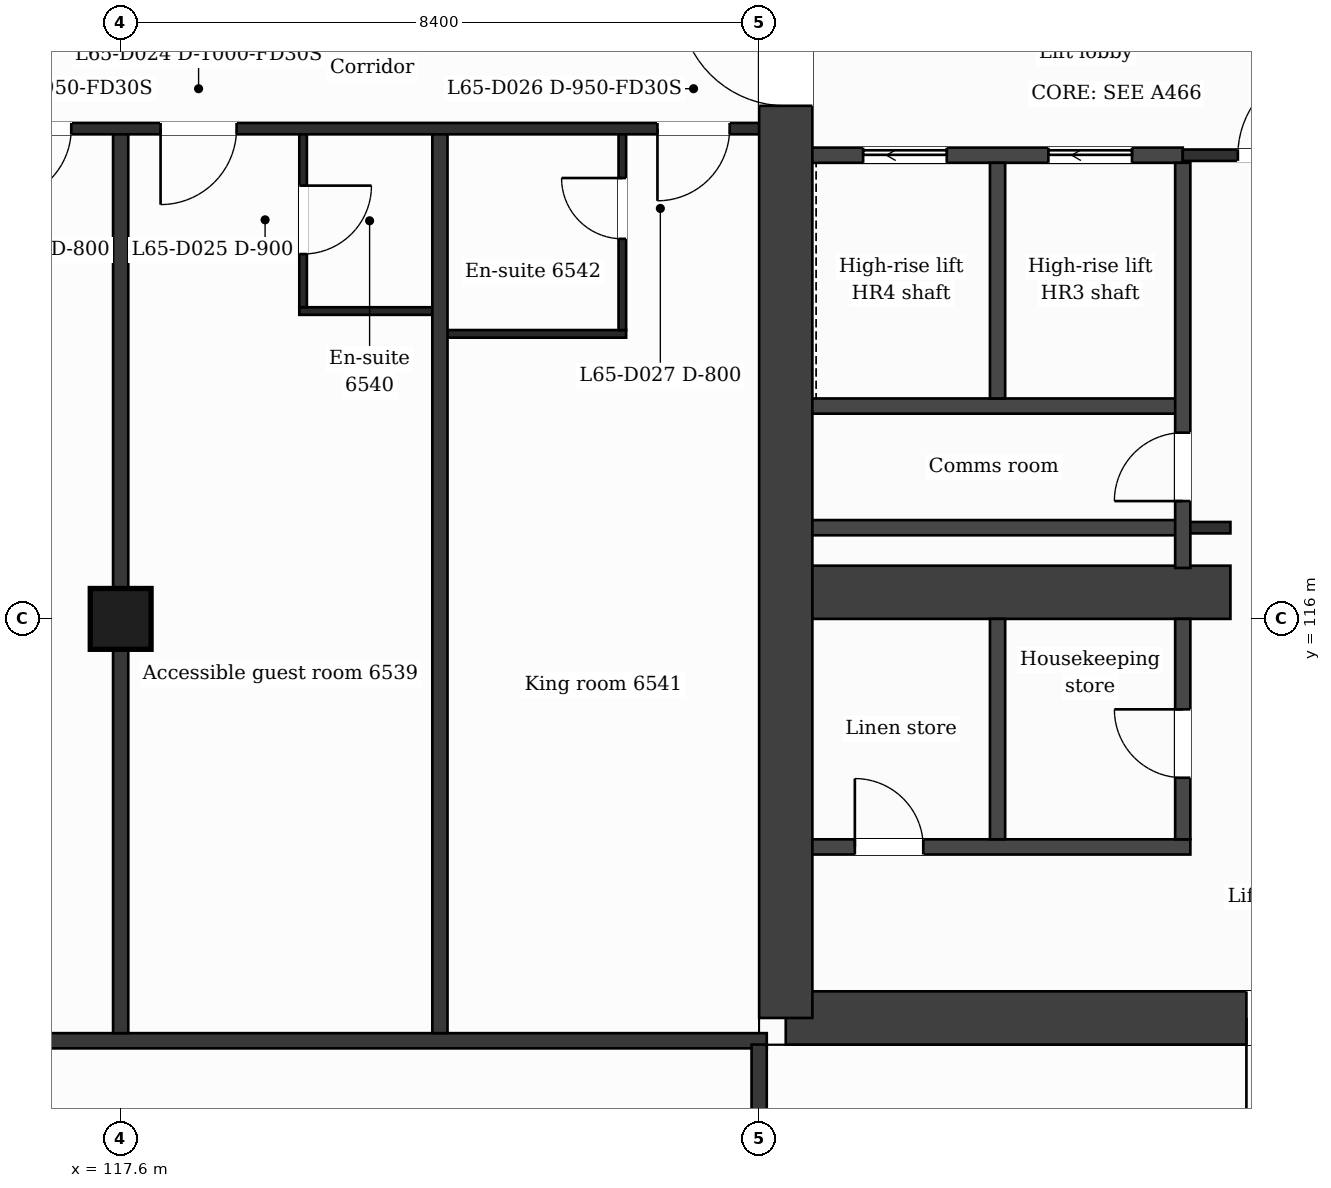
"""IFC4 building model, lengths in metres.
Left out: names, types, materials, properties, quantities, classifications, styles, units other than length and angle.
Written with IfcOpenShell. Run it as: python <this file> out.ifc"""

import sys

from ifc_helpers import new_model, si_unit, direction, frame, frame_2d, origin, origin_2d, place, context, subcontext, project, spatial, rectangle, extrude, element, fill, save


model = new_model("IFC4")
c1 = context("Model", 3, precision=1e-05, world=origin(), true_north=direction((0.0, 1.0)))
c2 = subcontext(c1, "Body", "Model", "MODEL_VIEW")
j1 = project(units=[si_unit("LENGTHUNIT", "METRE"), si_unit("PLANEANGLEUNIT", "RADIAN")], contexts=[c1])
p1 = place(None, origin())
s1 = spatial("IfcSite", under=j1, at=p1, CompositionType="ELEMENT")
p2 = place(p1, origin())
s2 = spatial("IfcBuilding", under=s1, at=p2, CompositionType="ELEMENT")
p3 = place(p2, frame((0.0, 0.0, 270.1)))
s3 = spatial("IfcBuildingStorey", under=s2, at=p3, CompositionType="ELEMENT", Elevation=270.1)
p4 = place(p3, frame((140.73, 110.75, 0.0), z_axis=(0.0, 0.0, 1.0), x_axis=(-1.0, 0.0, 0.0)))
e1 = element("IfcWall", 1, at=p4, inside=s3, PredefinedType="SHEAR", context=c2, shape_type="SweptSolid", body=[
    extrude(rectangle(XDim=14.38, YDim=0.7, at=frame_2d((7.19, 0.0))), origin(), (0.0, 0.0, 1.0), 3.7),
])
p5 = place(p4, frame((7.12, 0.0, 0.0)))
e2 = element("IfcOpeningElement", 2, at=p5, cuts=e1, PredefinedType="OPENING", context=c2, shape_type="SweptSolid", body=[
    extrude(rectangle(XDim=1.2, YDim=2.1, at=frame_2d((0.6, 1.05))), frame((0.0, 0.36, 0.0), z_axis=(0.0, -1.0, 0.0), x_axis=(1.0, 0.0, 0.0)), (0.0, 0.0, 1.0), 0.72),
])
p6 = place(p3, frame((126.35, 110.75, 0.0), z_axis=(0.0, 0.0, 1.0), x_axis=(0.0, 1.0, 0.0)))
e3 = element("IfcWall", 3, at=p6, inside=s3, PredefinedType="SHEAR", context=c2, shape_type="SweptSolid", body=[
    extrude(rectangle(XDim=21.3, YDim=0.7, at=frame_2d((10.65, 0.0))), origin(), (0.0, 0.0, 1.0), 3.7),
])
p7 = place(p6, frame((12.0, 0.0, 0.0)))
e4 = element("IfcOpeningElement", 4, at=p7, cuts=e3, PredefinedType="OPENING", context=c2, shape_type="SweptSolid", body=[
    extrude(rectangle(XDim=1.4, YDim=2.1, at=frame_2d((0.7, 1.05))), frame((0.0, 0.36, 0.0), z_axis=(0.0, -1.0, 0.0), x_axis=(1.0, 0.0, 0.0)), (0.0, 0.0, 1.0), 0.72),
])
p8 = place(p3, frame((126.7, 116.35, 0.0), z_axis=(0.0, 0.0, 1.0), x_axis=(1.0, 0.0, 0.0)))
e5 = element("IfcWall", 5, at=p8, inside=s3, PredefinedType="SHEAR", context=c2, shape_type="SweptSolid", body=[
    extrude(rectangle(XDim=5.5, YDim=0.7, at=frame_2d((2.75, 0.0))), origin(), (0.0, 0.0, 1.0), 3.7),
])
p9 = place(p3, frame((117.6, 116.0, 0.0), z_axis=(0.0, 0.0, 1.0), x_axis=(1.0, 0.0, 0.0)))
e6 = element("IfcColumn", 6, at=p9, inside=s3, PredefinedType="COLUMN", context=c2, shape_type="SweptSolid", body=[
    extrude(rectangle(XDim=0.8, YDim=0.8, at=origin_2d()), origin(), (0.0, 0.0, 1.0), 3.7),
])
p10 = place(p3, frame((100.7, 110.45, 0.0), z_axis=(0.0, 0.0, 1.0), x_axis=(1.0, 0.0, 0.0)))
e7 = element("IfcWall", 7, at=p10, inside=s3, PredefinedType="PARTITIONING", context=c2, shape_type="SweptSolid", body=[
    extrude(rectangle(XDim=25.4, YDim=0.2, at=frame_2d((12.7, 0.0))), origin(), (0.0, 0.0, 1.0), 3.38),
])
p11 = place(p3, frame((126.7, 113.0, 0.0), z_axis=(0.0, 0.0, 1.0), x_axis=(1.0, 0.0, 0.0)))
e8 = element("IfcWall", 8, at=p11, inside=s3, PredefinedType="PARTITIONING", context=c2, shape_type="SweptSolid", body=[
    extrude(rectangle(XDim=4.973, YDim=0.2, at=frame_2d((2.487, 0.0))), origin(), (0.0, 0.0, 1.0), 3.38),
])
p12 = place(p11, frame((0.559, 0.0, 0.0)))
e9 = element("IfcOpeningElement", 9, at=p12, cuts=e8, PredefinedType="OPENING", context=c2, shape_type="SweptSolid", body=[
    extrude(rectangle(XDim=0.9, YDim=2.1, at=frame_2d((0.45, 1.05))), frame((0.0, 0.11, 0.0), z_axis=(0.0, -1.0, 0.0), x_axis=(1.0, 0.0, 0.0)), (0.0, 0.0, 1.0), 0.22),
])
p13 = place(p3, frame((126.7, 117.2, 0.0), z_axis=(0.0, 0.0, 1.0), x_axis=(1.0, 0.0, 0.0)))
e10 = element("IfcWall", 10, at=p13, inside=s3, PredefinedType="PARTITIONING", context=c2, shape_type="SweptSolid", body=[
    extrude(rectangle(XDim=4.873, YDim=0.2, at=frame_2d((2.437, 0.0))), origin(), (0.0, 0.0, 1.0), 3.38),
])
p14 = place(p3, frame((131.573, 117.2, 0.0), z_axis=(0.0, 0.0, 1.0), x_axis=(1.0, 0.0, 0.0)))
e11 = element("IfcWall", 11, at=p14, inside=s3, PredefinedType="PARTITIONING", context=c2, shape_type="SweptSolid", body=[
    extrude(rectangle(XDim=0.627, YDim=0.15, at=frame_2d((0.313, 0.0))), origin(), (0.0, 0.0, 1.0), 3.38),
])
p15 = place(p3, frame((126.7, 118.8, 0.0), z_axis=(0.0, 0.0, 1.0), x_axis=(1.0, 0.0, 0.0)))
e12 = element("IfcWall", 12, at=p15, inside=s3, PredefinedType="PARTITIONING", context=c2, shape_type="SweptSolid", body=[
    extrude(rectangle(XDim=4.873, YDim=0.2, at=frame_2d((2.437, 0.0))), origin(), (0.0, 0.0, 1.0), 3.38),
])
p16 = place(p3, frame((121.8, 119.75, 0.0), z_axis=(0.0, 0.0, 1.0), x_axis=(1.0, 0.0, 0.0)))
e13 = element("IfcWall", 13, at=p16, inside=s3, PredefinedType="PARTITIONING", context=c2, shape_type="SweptSolid", body=[
    extrude(rectangle(XDim=2.45, YDim=0.1, at=frame_2d((1.225, 0.0))), origin(), (0.0, 0.0, 1.0), 3.38),
])
p17 = place(p3, frame((119.95, 120.05, 0.0), z_axis=(0.0, 0.0, 1.0), x_axis=(1.0, 0.0, 0.0)))
e14 = element("IfcWall", 14, at=p17, inside=s3, PredefinedType="PARTITIONING", context=c2, shape_type="SweptSolid", body=[
    extrude(rectangle(XDim=1.85, YDim=0.1, at=frame_2d((0.925, 0.0))), origin(), (0.0, 0.0, 1.0), 3.38),
])
p18 = place(p3, frame((126.7, 122.1, 0.0), z_axis=(0.0, 0.0, 1.0), x_axis=(1.0, 0.0, 0.0)))
e15 = element("IfcWall", 15, at=p18, inside=s3, PredefinedType="PARTITIONING", context=c2, shape_type="SweptSolid", body=[
    extrude(rectangle(XDim=4.873, YDim=0.2, at=frame_2d((2.437, 0.0))), origin(), (0.0, 0.0, 1.0), 3.38),
])
p19 = place(p18, frame((3.105, 0.0, 0.0)))
e16 = element("IfcOpeningElement", 16, at=p19, cuts=e15, PredefinedType="OPENING", context=c2, shape_type="SweptSolid", body=[
    extrude(rectangle(XDim=1.1, YDim=2.1, at=frame_2d((0.55, 1.05))), frame((0.0, 0.11, 0.0), z_axis=(0.0, -1.0, 0.0), x_axis=(1.0, 0.0, 0.0)), (0.0, 0.0, 1.0), 0.22),
])
p20 = place(p18, frame((0.668, 0.0, 0.0)))
e17 = element("IfcOpeningElement", 17, at=p20, cuts=e15, PredefinedType="OPENING", context=c2, shape_type="SweptSolid", body=[
    extrude(rectangle(XDim=1.1, YDim=2.1, at=frame_2d((0.55, 1.05))), frame((0.0, 0.11, 0.0), z_axis=(0.0, -1.0, 0.0), x_axis=(1.0, 0.0, 0.0)), (0.0, 0.0, 1.0), 0.22),
])
p21 = place(p3, frame((131.573, 122.1, 0.0), z_axis=(0.0, 0.0, 1.0), x_axis=(1.0, 0.0, 0.0)))
e18 = element("IfcWall", 18, at=p21, inside=s3, PredefinedType="PARTITIONING", context=c2, shape_type="SweptSolid", body=[
    extrude(rectangle(XDim=2.4, YDim=0.15, at=frame_2d((1.2, 0.0))), origin(), (0.0, 0.0, 1.0), 3.38),
])
p22 = place(p21, frame((0.725, 0.0, 0.0)))
e19 = element("IfcOpeningElement", 19, at=p22, cuts=e18, PredefinedType="OPENING", context=c2, shape_type="SweptSolid", body=[
    extrude(rectangle(XDim=1.2, YDim=2.1, at=frame_2d((0.6, 1.05))), frame((0.0, 0.085, 0.0), z_axis=(0.0, -1.0, 0.0), x_axis=(1.0, 0.0, 0.0)), (0.0, 0.0, 1.0), 0.17),
])
p23 = place(p3, frame((100.8, 122.45, 0.0), z_axis=(0.0, 0.0, 1.0), x_axis=(1.0, 0.0, 0.0)))
e20 = element("IfcWall", 20, at=p23, inside=s3, PredefinedType="PARTITIONING", context=c2, shape_type="SweptSolid", body=[
    extrude(rectangle(XDim=25.2, YDim=0.15, at=frame_2d((12.6, 0.0))), origin(), (0.0, 0.0, 1.0), 3.38),
])
p24 = place(p23, frame((5.55, 0.0, 0.0)))
e21 = element("IfcOpeningElement", 21, at=p24, cuts=e20, PredefinedType="OPENING", context=c2, shape_type="SweptSolid", body=[
    extrude(rectangle(XDim=1.0, YDim=2.1, at=frame_2d((0.5, 1.05))), frame((0.0, 0.085, 0.0), z_axis=(0.0, -1.0, 0.0), x_axis=(1.0, 0.0, 0.0)), (0.0, 0.0, 1.0), 0.17),
])
p25 = place(p23, frame((8.862, 0.0, 0.0)))
e22 = element("IfcOpeningElement", 22, at=p25, cuts=e20, PredefinedType="OPENING", context=c2, shape_type="SweptSolid", body=[
    extrude(rectangle(XDim=0.95, YDim=2.1, at=frame_2d((0.475, 1.05))), frame((0.0, 0.085, 0.0), z_axis=(0.0, -1.0, 0.0), x_axis=(1.0, 0.0, 0.0)), (0.0, 0.0, 1.0), 0.17),
])
p26 = place(p23, frame((15.2, 0.0, 0.0)))
e23 = element("IfcOpeningElement", 23, at=p26, cuts=e20, PredefinedType="OPENING", context=c2, shape_type="SweptSolid", body=[
    extrude(rectangle(XDim=0.95, YDim=2.1, at=frame_2d((0.475, 1.05))), frame((0.0, 0.085, 0.0), z_axis=(0.0, -1.0, 0.0), x_axis=(1.0, 0.0, 0.0)), (0.0, 0.0, 1.0), 0.17),
])
p27 = place(p23, frame((17.325, 0.0, 0.0)))
e24 = element("IfcOpeningElement", 24, at=p27, cuts=e20, PredefinedType="OPENING", context=c2, shape_type="SweptSolid", body=[
    extrude(rectangle(XDim=1.0, YDim=2.1, at=frame_2d((0.5, 1.05))), frame((0.0, 0.085, 0.0), z_axis=(0.0, -1.0, 0.0), x_axis=(1.0, 0.0, 0.0)), (0.0, 0.0, 1.0), 0.17),
])
p28 = place(p23, frame((23.862, 0.0, 0.0)))
e25 = element("IfcOpeningElement", 25, at=p28, cuts=e20, PredefinedType="OPENING", context=c2, shape_type="SweptSolid", body=[
    extrude(rectangle(XDim=0.95, YDim=2.1, at=frame_2d((0.475, 1.05))), frame((0.0, 0.085, 0.0), z_axis=(0.0, -1.0, 0.0), x_axis=(1.0, 0.0, 0.0)), (0.0, 0.0, 1.0), 0.17),
])
p29 = place(p3, frame((117.6, 110.55, 0.0), z_axis=(0.0, 0.0, 1.0), x_axis=(0.0, 1.0, 0.0)))
e26 = element("IfcWall", 26, at=p29, inside=s3, PredefinedType="PARTITIONING", context=c2, shape_type="SweptSolid", body=[
    extrude(rectangle(XDim=11.825, YDim=0.2, at=frame_2d((5.913, 0.0))), origin(), (0.0, 0.0, 1.0), 3.38),
])
p30 = place(p3, frame((120.0, 120.1, 0.0), z_axis=(0.0, 0.0, 1.0), x_axis=(0.0, 1.0, 0.0)))
e27 = element("IfcWall", 27, at=p30, inside=s3, PredefinedType="PARTITIONING", context=c2, shape_type="SweptSolid", body=[
    extrude(rectangle(XDim=2.275, YDim=0.1, at=frame_2d((1.137, 0.0))), origin(), (0.0, 0.0, 1.0), 3.38),
])
p31 = place(p30, frame((0.7, 0.0, 0.0)))
e28 = element("IfcOpeningElement", 28, at=p31, cuts=e27, PredefinedType="OPENING", context=c2, shape_type="SweptSolid", body=[
    extrude(rectangle(XDim=0.9, YDim=2.1, at=frame_2d((0.45, 1.05))), frame((0.0, 0.06, 0.0), z_axis=(0.0, -1.0, 0.0), x_axis=(1.0, 0.0, 0.0)), (0.0, 0.0, 1.0), 0.12),
])
p32 = place(p3, frame((121.8, 110.55, 0.0), z_axis=(0.0, 0.0, 1.0), x_axis=(0.0, 1.0, 0.0)))
e29 = element("IfcWall", 29, at=p32, inside=s3, PredefinedType="PARTITIONING", context=c2, shape_type="SweptSolid", body=[
    extrude(rectangle(XDim=11.825, YDim=0.2, at=frame_2d((5.913, 0.0))), origin(), (0.0, 0.0, 1.0), 3.38),
])
p33 = place(p3, frame((124.2, 119.8, 0.0), z_axis=(0.0, 0.0, 1.0), x_axis=(0.0, 1.0, 0.0)))
e30 = element("IfcWall", 30, at=p33, inside=s3, PredefinedType="PARTITIONING", context=c2, shape_type="SweptSolid", body=[
    extrude(rectangle(XDim=2.575, YDim=0.1, at=frame_2d((1.288, 0.0))), origin(), (0.0, 0.0, 1.0), 3.38),
])
p34 = place(p33, frame((1.2, 0.0, 0.0)))
e31 = element("IfcOpeningElement", 31, at=p34, cuts=e30, PredefinedType="OPENING", context=c2, shape_type="SweptSolid", body=[
    extrude(rectangle(XDim=0.8, YDim=2.1, at=frame_2d((0.4, 1.05))), frame((0.0, 0.06, 0.0), z_axis=(0.0, -1.0, 0.0), x_axis=(1.0, 0.0, 0.0)), (0.0, 0.0, 1.0), 0.12),
])
p35 = place(p3, frame((126.0, 108.79, 0.0), z_axis=(0.0, 0.0, 1.0), x_axis=(0.0, 1.0, 0.0)))
e32 = element("IfcWall", 32, at=p35, inside=s3, PredefinedType="PARTITIONING", context=c2, shape_type="SweptSolid", body=[
    extrude(rectangle(XDim=1.61, YDim=0.2, at=frame_2d((0.805, 0.0))), origin(), (0.0, 0.0, 1.0), 3.38),
])
p36 = place(p3, frame((129.136, 113.1, 0.0), z_axis=(0.0, 0.0, 1.0), x_axis=(0.0, 1.0, 0.0)))
e33 = element("IfcWall", 33, at=p36, inside=s3, PredefinedType="PARTITIONING", context=c2, shape_type="SweptSolid", body=[
    extrude(rectangle(XDim=2.9, YDim=0.2, at=frame_2d((1.45, 0.0))), origin(), (0.0, 0.0, 1.0), 3.38),
])
p37 = place(p3, frame((129.136, 118.9, 0.0), z_axis=(0.0, 0.0, 1.0), x_axis=(0.0, 1.0, 0.0)))
e34 = element("IfcWall", 34, at=p37, inside=s3, PredefinedType="PARTITIONING", context=c2, shape_type="SweptSolid", body=[
    extrude(rectangle(XDim=3.1, YDim=0.2, at=frame_2d((1.55, 0.0))), origin(), (0.0, 0.0, 1.0), 3.38),
])
p38 = place(p3, frame((131.573, 113.1, 0.0), z_axis=(0.0, 0.0, 1.0), x_axis=(0.0, 1.0, 0.0)))
e35 = element("IfcWall", 35, at=p38, inside=s3, PredefinedType="PARTITIONING", context=c2, shape_type="SweptSolid", body=[
    extrude(rectangle(XDim=2.9, YDim=0.2, at=frame_2d((1.45, 0.0))), origin(), (0.0, 0.0, 1.0), 3.38),
])
p39 = place(p38, frame((0.81, 0.0, 0.0)))
e36 = element("IfcOpeningElement", 36, at=p39, cuts=e35, PredefinedType="OPENING", context=c2, shape_type="SweptSolid", body=[
    extrude(rectangle(XDim=0.9, YDim=2.1, at=frame_2d((0.45, 1.05))), frame((0.0, 0.11, 0.0), z_axis=(0.0, -1.0, 0.0), x_axis=(1.0, 0.0, 0.0)), (0.0, 0.0, 1.0), 0.22),
])
p40 = place(p3, frame((131.573, 116.67, 0.0), z_axis=(0.0, 0.0, 1.0), x_axis=(0.0, 1.0, 0.0)))
e37 = element("IfcWall", 37, at=p40, inside=s3, PredefinedType="PARTITIONING", context=c2, shape_type="SweptSolid", body=[
    extrude(rectangle(XDim=5.33, YDim=0.2, at=frame_2d((2.665, 0.0))), origin(), (0.0, 0.0, 1.0), 3.38),
])
p41 = place(p40, frame((0.88, 0.0, 0.0)))
e38 = element("IfcOpeningElement", 38, at=p41, cuts=e37, PredefinedType="OPENING", context=c2, shape_type="SweptSolid", body=[
    extrude(rectangle(XDim=0.9, YDim=2.1, at=frame_2d((0.45, 1.05))), frame((0.0, 0.11, 0.0), z_axis=(0.0, -1.0, 0.0), x_axis=(1.0, 0.0, 0.0)), (0.0, 0.0, 1.0), 0.22),
])
p42 = place(p22, origin())
e39 = element("IfcDoor", 39, at=p42, inside=s3, OperationType="SINGLE_SWING_RIGHT", PredefinedType="DOOR", context=c2, shape_type="SweptSolid", body=[
    extrude(rectangle(XDim=1.2, YDim=2.1, at=frame_2d((0.6, 1.05))), frame((0.0, 0.025, 0.0), z_axis=(0.0, -1.0, 0.0), x_axis=(1.0, 0.0, 0.0)), (0.0, 0.0, 1.0), 0.05),
])
fill(e19, e39)
p43 = place(p19, origin())
e40 = element("IfcDoor", 40, at=p43, inside=s3, OperationType="SLIDING_TO_LEFT", PredefinedType="DOOR", context=c2, shape_type="SweptSolid", body=[
    extrude(rectangle(XDim=1.1, YDim=2.1, at=frame_2d((0.55, 1.05))), frame((0.0, 0.025, 0.0), z_axis=(0.0, -1.0, 0.0), x_axis=(1.0, 0.0, 0.0)), (0.0, 0.0, 1.0), 0.05),
])
fill(e16, e40)
p44 = place(p20, origin())
e41 = element("IfcDoor", 41, at=p44, inside=s3, OperationType="SLIDING_TO_LEFT", PredefinedType="DOOR", context=c2, shape_type="SweptSolid", body=[
    extrude(rectangle(XDim=1.1, YDim=2.1, at=frame_2d((0.55, 1.05))), frame((0.0, 0.025, 0.0), z_axis=(0.0, -1.0, 0.0), x_axis=(1.0, 0.0, 0.0)), (0.0, 0.0, 1.0), 0.05),
])
fill(e17, e41)
p45 = place(p41, origin())
e42 = element("IfcDoor", 42, at=p45, inside=s3, OperationType="SINGLE_SWING_LEFT", PredefinedType="DOOR", context=c2, shape_type="SweptSolid", body=[
    extrude(rectangle(XDim=0.9, YDim=2.1, at=frame_2d((0.45, 1.05))), frame((0.0, 0.025, 0.0), z_axis=(0.0, -1.0, 0.0), x_axis=(1.0, 0.0, 0.0)), (0.0, 0.0, 1.0), 0.05),
])
fill(e38, e42)
p46 = place(p39, origin())
e43 = element("IfcDoor", 43, at=p46, inside=s3, OperationType="SINGLE_SWING_RIGHT", PredefinedType="DOOR", context=c2, shape_type="SweptSolid", body=[
    extrude(rectangle(XDim=0.9, YDim=2.1, at=frame_2d((0.45, 1.05))), frame((0.0, 0.025, 0.0), z_axis=(0.0, -1.0, 0.0), x_axis=(1.0, 0.0, 0.0)), (0.0, 0.0, 1.0), 0.05),
])
fill(e36, e43)
p47 = place(p12, origin())
e44 = element("IfcDoor", 44, at=p47, inside=s3, OperationType="SINGLE_SWING_LEFT", PredefinedType="DOOR", context=c2, shape_type="SweptSolid", body=[
    extrude(rectangle(XDim=0.9, YDim=2.1, at=frame_2d((0.45, 1.05))), frame((0.0, 0.025, 0.0), z_axis=(0.0, -1.0, 0.0), x_axis=(1.0, 0.0, 0.0)), (0.0, 0.0, 1.0), 0.05),
])
fill(e9, e44)
p48 = place(p26, origin())
e45 = element("IfcDoor", 45, at=p48, inside=s3, OperationType="SINGLE_SWING_LEFT", PredefinedType="DOOR", context=c2, shape_type="SweptSolid", body=[
    extrude(rectangle(XDim=0.95, YDim=2.1, at=frame_2d((0.475, 1.05))), frame((0.0, 0.025, 0.0), z_axis=(0.0, -1.0, 0.0), x_axis=(1.0, 0.0, 0.0)), (0.0, 0.0, 1.0), 0.05),
])
fill(e23, e45)
p49 = place(p27, origin())
e46 = element("IfcDoor", 46, at=p49, inside=s3, OperationType="SINGLE_SWING_LEFT", PredefinedType="DOOR", context=c2, shape_type="SweptSolid", body=[
    extrude(rectangle(XDim=1.0, YDim=2.1, at=frame_2d((0.5, 1.05))), frame((0.0, 0.025, 0.0), z_axis=(0.0, -1.0, 0.0), x_axis=(1.0, 0.0, 0.0)), (0.0, 0.0, 1.0), 0.05),
])
fill(e24, e46)
p50 = place(p31, origin())
e47 = element("IfcDoor", 47, at=p50, inside=s3, OperationType="SINGLE_SWING_RIGHT", PredefinedType="DOOR", context=c2, shape_type="SweptSolid", body=[
    extrude(rectangle(XDim=0.9, YDim=2.1, at=frame_2d((0.45, 1.05))), frame((0.0, 0.025, 0.0), z_axis=(0.0, -1.0, 0.0), x_axis=(1.0, 0.0, 0.0)), (0.0, 0.0, 1.0), 0.05),
])
fill(e28, e47)
p51 = place(p28, origin())
e48 = element("IfcDoor", 48, at=p51, inside=s3, OperationType="SINGLE_SWING_LEFT", PredefinedType="DOOR", context=c2, shape_type="SweptSolid", body=[
    extrude(rectangle(XDim=0.95, YDim=2.1, at=frame_2d((0.475, 1.05))), frame((0.0, 0.025, 0.0), z_axis=(0.0, -1.0, 0.0), x_axis=(1.0, 0.0, 0.0)), (0.0, 0.0, 1.0), 0.05),
])
fill(e25, e48)
p52 = place(p34, origin())
e49 = element("IfcDoor", 49, at=p52, inside=s3, OperationType="SINGLE_SWING_RIGHT", PredefinedType="DOOR", context=c2, shape_type="SweptSolid", body=[
    extrude(rectangle(XDim=0.8, YDim=2.1, at=frame_2d((0.4, 1.05))), frame((0.0, 0.025, 0.0), z_axis=(0.0, -1.0, 0.0), x_axis=(1.0, 0.0, 0.0)), (0.0, 0.0, 1.0), 0.05),
])
fill(e31, e49)
p53 = place(p5, origin())
e50 = element("IfcDoor", 50, at=p53, inside=s3, OperationType="SINGLE_SWING_RIGHT", PredefinedType="DOOR", context=c2, shape_type="SweptSolid", body=[
    extrude(rectangle(XDim=1.2, YDim=2.1, at=frame_2d((0.6, 1.05))), frame((0.0, 0.025, 0.0), z_axis=(0.0, -1.0, 0.0), x_axis=(1.0, 0.0, 0.0)), (0.0, 0.0, 1.0), 0.05),
])
fill(e2, e50)
p54 = place(p7, origin())
e51 = element("IfcDoor", 51, at=p54, inside=s3, OperationType="SINGLE_SWING_RIGHT", PredefinedType="DOOR", context=c2, shape_type="SweptSolid", body=[
    extrude(rectangle(XDim=1.4, YDim=2.1, at=frame_2d((0.7, 1.05))), frame((0.0, 0.025, 0.0), z_axis=(0.0, -1.0, 0.0), x_axis=(1.0, 0.0, 0.0)), (0.0, 0.0, 1.0), 0.05),
])
fill(e4, e51)
save(model, sys.argv[1])
